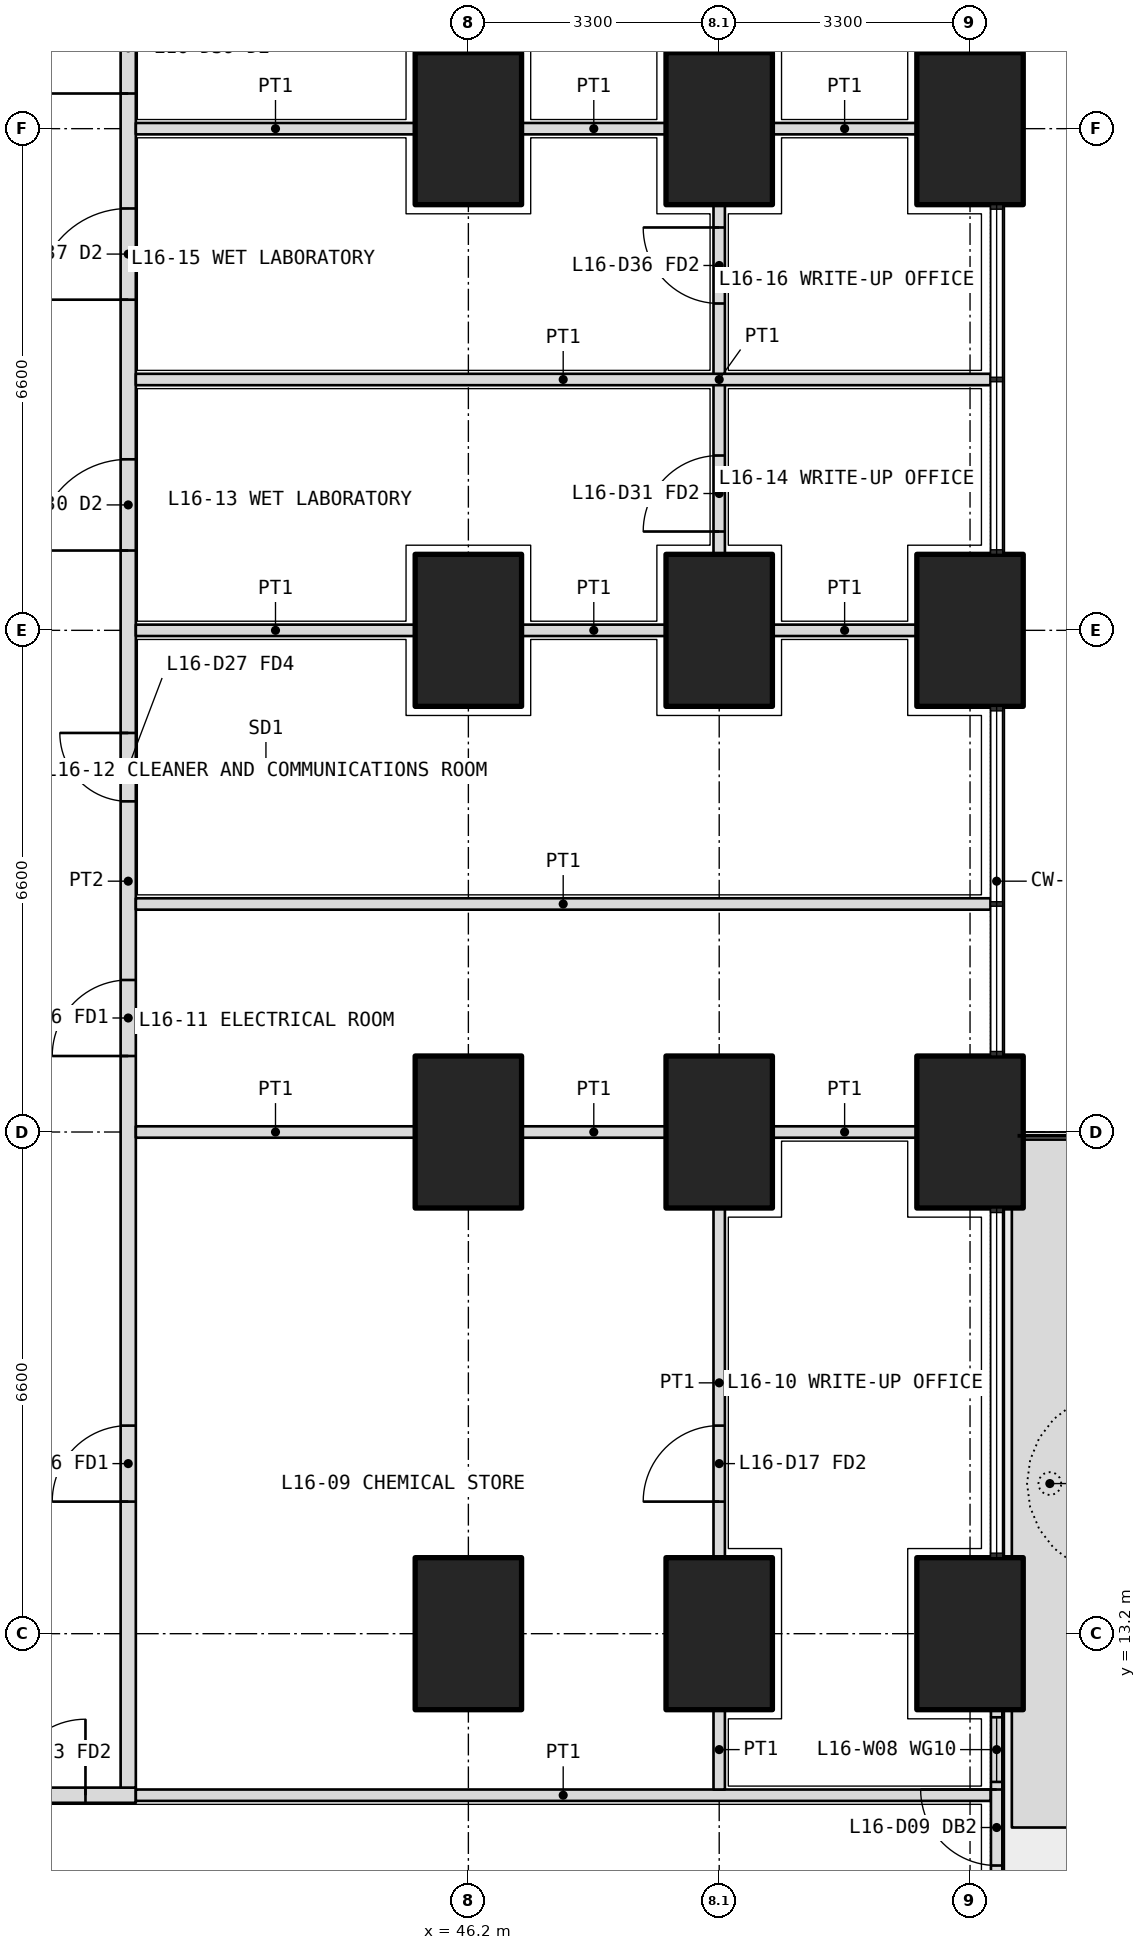
"""IFC4 building model, lengths in metres.
Left out: names, types, materials, properties, quantities, classifications, styles, units other than length and angle.
Written with IfcOpenShell. Run it as: python <this file> out.ifc"""

import sys

from ifc_helpers import new_model, si_unit, direction, frame, frame_2d, origin, origin_2d, place, context, subcontext, project, spatial, polyline, rectangle, outline, extrude, element, fill, save


model = new_model("IFC4")
c1 = context("Model", 3, precision=1e-05, world=origin(), true_north=direction((0.0, 1.0)))
c2 = subcontext(c1, "Body", "Model", "MODEL_VIEW")
j1 = project(units=[si_unit("LENGTHUNIT", "METRE"), si_unit("PLANEANGLEUNIT", "RADIAN")], contexts=[c1])
p1 = place(None, origin())
s1 = spatial("IfcSite", under=j1, at=p1, CompositionType="ELEMENT")
p2 = place(p1, origin())
s2 = spatial("IfcBuilding", under=s1, at=p2, CompositionType="ELEMENT")
p3 = place(p2, frame((0.0, 0.0, 71.7)))
s3 = spatial("IfcBuildingStorey", under=s2, at=p3, CompositionType="ELEMENT", Elevation=71.7)
for number, where, z_axis, x_axis in (
    (1, (52.8, 13.2, 0.0), (0.0, 0.0, 1.0), (0.0, 1.0, 0.0)),
    (2, (52.8, 19.8, 0.0), (0.0, 0.0, 1.0), (0.0, 1.0, 0.0)),
    (3, (52.8, 26.4, 0.0), (0.0, 0.0, 1.0), (0.0, 1.0, 0.0)),
    (4, (52.8, 33.0, 0.0), (0.0, 0.0, 1.0), (0.0, 1.0, 0.0)),
    (5, (49.5, 13.2, 0.0), (0.0, 0.0, 1.0), (0.0, 1.0, 0.0)),
    (6, (49.5, 19.8, 0.0), (0.0, 0.0, 1.0), (0.0, 1.0, 0.0)),
    (7, (49.5, 26.4, 0.0), (0.0, 0.0, 1.0), (0.0, 1.0, 0.0)),
    (8, (49.5, 33.0, 0.0), (0.0, 0.0, 1.0), (0.0, 1.0, 0.0)),
    (9, (46.2, 13.2, 0.0), (0.0, 0.0, 1.0), (0.0, 1.0, 0.0)),
    (10, (46.2, 19.8, 0.0), (0.0, 0.0, 1.0), (0.0, 1.0, 0.0)),
    (11, (46.2, 26.4, 0.0), (0.0, 0.0, 1.0), (0.0, 1.0, 0.0)),
    (12, (46.2, 33.0, 0.0), (0.0, 0.0, 1.0), (0.0, 1.0, 0.0)),
):
    element("IfcColumn", number, at=place(p3, frame(where, z_axis=z_axis, x_axis=x_axis)), inside=s3, PredefinedType="COLUMN", context=c2, shape_type="SweptSolid", body=[
        extrude(rectangle(XDim=2.0, YDim=1.4, at=origin_2d()), origin(), (0.0, 0.0, 1.0), 4.2),
    ])
p4 = place(p3, origin())
e13 = element("IfcWall", 13, at=p4, inside=s3, PredefinedType="USERDEFINED", context=c2, shape_type="SweptSolid", body=[
    extrude(outline(polyline([(53.35, 10.65), (54.35, 10.65), (54.35, 19.7), (53.35, 19.7), (53.35, 10.65)]), holes=[polyline([(53.5, 10.8), (54.2, 10.8), (54.2, 19.55), (53.5, 19.55), (53.5, 10.8)])]), origin(), (0.0, 0.0, 1.0), 1.05),
])
p5 = place(p3, frame((53.15, 7.6, 0.0), z_axis=(0.0, 0.0, 1.0), x_axis=(0.0, 1.0, 0.0)))
e14 = element("IfcWall", 14, at=p5, inside=s3, PredefinedType="SOLIDWALL", context=c2, shape_type="SweptSolid", body=[
    extrude(rectangle(XDim=4.6, YDim=0.15, at=frame_2d((2.3, 0.0))), origin(), (0.0, 0.0, 1.0), 2.05),
])
p6 = place(p5, frame((2.55, 0.0, 0.0)))
e15 = element("IfcOpeningElement", 15, at=p6, cuts=e14, PredefinedType="OPENING", context=c2, shape_type="SweptSolid", body=[
    extrude(rectangle(XDim=1.0, YDim=2.0, at=frame_2d((0.5, 1.0))), frame((0.0, 0.085, 0.0), z_axis=(0.0, -1.0, 0.0), x_axis=(1.0, 0.0, 0.0)), (0.0, 0.0, 1.0), 0.17),
])
p7 = place(p5, frame((0.1, 0.0, 0.1)))
e16 = element("IfcOpeningElement", 16, at=p7, cuts=e14, PredefinedType="OPENING", context=c2, shape_type="SweptSolid", body=[
    extrude(rectangle(XDim=1.95, YDim=1.65, at=frame_2d((0.975, 0.825))), frame((0.0, 0.085, 0.0), z_axis=(0.0, -1.0, 0.0), x_axis=(1.0, 0.0, 0.0)), (0.0, 0.0, 1.0), 0.17),
])
p8 = place(p5, frame((3.65, 0.0, 0.1)))
e17 = element("IfcOpeningElement", 17, at=p8, cuts=e14, PredefinedType="OPENING", context=c2, shape_type="SweptSolid", body=[
    extrude(rectangle(XDim=0.85, YDim=1.65, at=frame_2d((0.425, 0.825))), frame((0.0, 0.085, 0.0), z_axis=(0.0, -1.0, 0.0), x_axis=(1.0, 0.0, 0.0)), (0.0, 0.0, 1.0), 0.17),
])
p9 = place(p3, frame((10.975, 11.075, 0.0), z_axis=(0.0, 0.0, 1.0), x_axis=(1.0, 0.0, 0.0)))
e18 = element("IfcWall", 18, at=p9, inside=s3, PredefinedType="PARTITIONING", context=c2, shape_type="SweptSolid", body=[
    extrude(rectangle(XDim=30.85, YDim=0.2, at=frame_2d((15.425, 0.0))), origin(), (0.0, 0.0, 1.0), 2.55),
])
p10 = place(p9, frame((2.312, 0.0, 0.0)))
e19 = element("IfcOpeningElement", 19, at=p10, cuts=e18, PredefinedType="OPENING", context=c2, shape_type="SweptSolid", body=[
    extrude(rectangle(XDim=1.0, YDim=2.1, at=frame_2d((0.5, 1.05))), frame((0.0, 0.11, 0.0), z_axis=(0.0, -1.0, 0.0), x_axis=(1.0, 0.0, 0.0)), (0.0, 0.0, 1.0), 0.22),
])
p11 = place(p9, frame((11.625, 0.0, 0.0)))
e20 = element("IfcOpeningElement", 20, at=p11, cuts=e18, PredefinedType="OPENING", context=c2, shape_type="SweptSolid", body=[
    extrude(rectangle(XDim=1.0, YDim=2.1, at=frame_2d((0.5, 1.05))), frame((0.0, 0.11, 0.0), z_axis=(0.0, -1.0, 0.0), x_axis=(1.0, 0.0, 0.0)), (0.0, 0.0, 1.0), 0.22),
])
p12 = place(p9, frame((23.075, 0.0, 0.0)))
e21 = element("IfcOpeningElement", 21, at=p12, cuts=e18, PredefinedType="OPENING", context=c2, shape_type="SweptSolid", body=[
    extrude(rectangle(XDim=1.2, YDim=2.1, at=frame_2d((0.6, 1.05))), frame((0.0, 0.11, 0.0), z_axis=(0.0, -1.0, 0.0), x_axis=(1.0, 0.0, 0.0)), (0.0, 0.0, 1.0), 0.22),
])
p13 = place(p9, frame((29.188, 0.0, 0.0)))
e22 = element("IfcOpeningElement", 22, at=p13, cuts=e18, PredefinedType="OPENING", context=c2, shape_type="SweptSolid", body=[
    extrude(rectangle(XDim=1.0, YDim=2.1, at=frame_2d((0.5, 1.05))), frame((0.0, 0.11, 0.0), z_axis=(0.0, -1.0, 0.0), x_axis=(1.0, 0.0, 0.0)), (0.0, 0.0, 1.0), 0.22),
])
p14 = place(p3, frame((41.725, 11.175, 0.0), z_axis=(0.0, 0.0, 1.0), x_axis=(0.0, 1.0, 0.0)))
e23 = element("IfcWall", 23, at=p14, inside=s3, PredefinedType="PARTITIONING", context=c2, shape_type="SweptSolid", body=[
    extrude(rectangle(XDim=23.85, YDim=0.2, at=frame_2d((11.925, 0.0))), origin(), (0.0, 0.0, 1.0), 2.55),
])
p15 = place(p14, frame((3.762, 0.0, 0.0)))
e24 = element("IfcOpeningElement", 24, at=p15, cuts=e23, PredefinedType="OPENING", context=c2, shape_type="SweptSolid", body=[
    extrude(rectangle(XDim=1.0, YDim=2.1, at=frame_2d((0.5, 1.05))), frame((0.0, 0.11, 0.0), z_axis=(0.0, -1.0, 0.0), x_axis=(1.0, 0.0, 0.0)), (0.0, 0.0, 1.0), 0.22),
])
p16 = place(p14, frame((9.625, 0.0, 0.0)))
e25 = element("IfcOpeningElement", 25, at=p16, cuts=e23, PredefinedType="OPENING", context=c2, shape_type="SweptSolid", body=[
    extrude(rectangle(XDim=1.0, YDim=2.1, at=frame_2d((0.5, 1.05))), frame((0.0, 0.11, 0.0), z_axis=(0.0, -1.0, 0.0), x_axis=(1.0, 0.0, 0.0)), (0.0, 0.0, 1.0), 0.22),
])
p17 = place(p14, frame((12.975, 0.0, 0.0)))
e26 = element("IfcOpeningElement", 26, at=p17, cuts=e23, PredefinedType="OPENING", context=c2, shape_type="SweptSolid", body=[
    extrude(rectangle(XDim=0.9, YDim=2.1, at=frame_2d((0.45, 1.05))), frame((0.0, 0.11, 0.0), z_axis=(0.0, -1.0, 0.0), x_axis=(1.0, 0.0, 0.0)), (0.0, 0.0, 1.0), 0.22),
])
p18 = place(p14, frame((16.275, 0.0, 0.0)))
e27 = element("IfcOpeningElement", 27, at=p18, cuts=e23, PredefinedType="OPENING", context=c2, shape_type="SweptSolid", body=[
    extrude(rectangle(XDim=1.2, YDim=2.1, at=frame_2d((0.6, 1.05))), frame((0.0, 0.11, 0.0), z_axis=(0.0, -1.0, 0.0), x_axis=(1.0, 0.0, 0.0)), (0.0, 0.0, 1.0), 0.22),
])
p19 = place(p14, frame((19.575, 0.0, 0.0)))
e28 = element("IfcOpeningElement", 28, at=p19, cuts=e23, PredefinedType="OPENING", context=c2, shape_type="SweptSolid", body=[
    extrude(rectangle(XDim=1.2, YDim=2.1, at=frame_2d((0.6, 1.05))), frame((0.0, 0.11, 0.0), z_axis=(0.0, -1.0, 0.0), x_axis=(1.0, 0.0, 0.0)), (0.0, 0.0, 1.0), 0.22),
])
p20 = place(p14, frame((22.288, 0.0, 0.0)))
e29 = element("IfcOpeningElement", 29, at=p20, cuts=e23, PredefinedType="OPENING", context=c2, shape_type="SweptSolid", body=[
    extrude(rectangle(XDim=1.2, YDim=2.1, at=frame_2d((0.6, 1.05))), frame((0.0, 0.11, 0.0), z_axis=(0.0, -1.0, 0.0), x_axis=(1.0, 0.0, 0.0)), (0.0, 0.0, 1.0), 0.22),
])
p21 = place(p3, frame((53.07, 11.075, 0.0), z_axis=(0.0, 0.0, 1.0), x_axis=(-1.0, 0.0, 0.0)))
e30 = element("IfcWall", 30, at=p21, inside=s3, PredefinedType="PARTITIONING", context=c2, shape_type="SweptSolid", body=[
    extrude(rectangle(XDim=11.245, YDim=0.15, at=frame_2d((5.623, 0.0))), origin(), (0.0, 0.0, 1.0), 3.85),
])
p22 = place(p3, frame((49.5, 11.15, 0.0), z_axis=(0.0, 0.0, 1.0), x_axis=(0.0, 1.0, 0.0)))
e31 = element("IfcWall", 31, at=p22, inside=s3, PredefinedType="PARTITIONING", context=c2, shape_type="SweptSolid", body=[
    extrude(rectangle(XDim=1.05, YDim=0.15, at=frame_2d((0.525, 0.0))), origin(), (0.0, 0.0, 1.0), 2.55),
])
p23 = place(p3, frame((49.5, 14.2, 0.0), z_axis=(0.0, 0.0, 1.0), x_axis=(0.0, 1.0, 0.0)))
e32 = element("IfcWall", 32, at=p23, inside=s3, PredefinedType="PARTITIONING", context=c2, shape_type="SweptSolid", body=[
    extrude(rectangle(XDim=4.6, YDim=0.15, at=frame_2d((2.3, 0.0))), origin(), (0.0, 0.0, 1.0), 2.55),
])
p24 = place(p23, frame((0.738, 0.0, 0.0)))
e33 = element("IfcOpeningElement", 33, at=p24, cuts=e32, PredefinedType="OPENING", context=c2, shape_type="SweptSolid", body=[
    extrude(rectangle(XDim=1.0, YDim=2.1, at=frame_2d((0.5, 1.05))), frame((0.0, 0.085, 0.0), z_axis=(0.0, -1.0, 0.0), x_axis=(1.0, 0.0, 0.0)), (0.0, 0.0, 1.0), 0.17),
])
p25 = place(p3, frame((49.5, 27.4, 0.0), z_axis=(0.0, 0.0, 1.0), x_axis=(0.0, 1.0, 0.0)))
e34 = element("IfcWall", 34, at=p25, inside=s3, PredefinedType="PARTITIONING", context=c2, shape_type="SweptSolid", body=[
    extrude(rectangle(XDim=4.6, YDim=0.15, at=frame_2d((2.3, 0.0))), origin(), (0.0, 0.0, 1.0), 2.55),
])
p26 = place(p25, frame((0.3, 0.0, 0.0)))
e35 = element("IfcOpeningElement", 35, at=p26, cuts=e34, PredefinedType="OPENING", context=c2, shape_type="SweptSolid", body=[
    extrude(rectangle(XDim=1.0, YDim=2.1, at=frame_2d((0.5, 1.05))), frame((0.0, 0.085, 0.0), z_axis=(0.0, -1.0, 0.0), x_axis=(1.0, 0.0, 0.0)), (0.0, 0.0, 1.0), 0.17),
])
p27 = place(p25, frame((3.3, 0.0, 0.0)))
e36 = element("IfcOpeningElement", 36, at=p27, cuts=e34, PredefinedType="OPENING", context=c2, shape_type="SweptSolid", body=[
    extrude(rectangle(XDim=1.0, YDim=2.1, at=frame_2d((0.5, 1.05))), frame((0.0, 0.085, 0.0), z_axis=(0.0, -1.0, 0.0), x_axis=(1.0, 0.0, 0.0)), (0.0, 0.0, 1.0), 0.17),
])
p28 = place(p3, frame((53.07, 22.8, 0.0), z_axis=(0.0, 0.0, 1.0), x_axis=(-1.0, 0.0, 0.0)))
e37 = element("IfcWall", 37, at=p28, inside=s3, PredefinedType="PARTITIONING", context=c2, shape_type="SweptSolid", body=[
    extrude(rectangle(XDim=11.245, YDim=0.15, at=frame_2d((5.623, 0.0))), origin(), (0.0, 0.0, 1.0), 3.85),
])
for number, where, z_axis, x_axis in (
    (38, (52.1, 26.4, 0.0), (0.0, 0.0, 1.0), (-1.0, 0.0, 0.0)),
    (39, (48.8, 26.4, 0.0), (0.0, 0.0, 1.0), (-1.0, 0.0, 0.0)),
):
    element("IfcWall", number, at=place(p3, frame(where, z_axis=z_axis, x_axis=x_axis)), inside=s3, PredefinedType="PARTITIONING", context=c2, shape_type="SweptSolid", body=[
        extrude(rectangle(XDim=1.9, YDim=0.15, at=frame_2d((0.95, 0.0))), origin(), (0.0, 0.0, 1.0), 2.55),
    ])
p29 = place(p3, frame((45.5, 26.4, 0.0), z_axis=(0.0, 0.0, 1.0), x_axis=(-1.0, 0.0, 0.0)))
e40 = element("IfcWall", 40, at=p29, inside=s3, PredefinedType="PARTITIONING", context=c2, shape_type="SweptSolid", body=[
    extrude(rectangle(XDim=3.675, YDim=0.15, at=frame_2d((1.837, 0.0))), origin(), (0.0, 0.0, 1.0), 2.55),
])
for number, where, z_axis, x_axis in (
    (41, (52.1, 19.8, 0.0), (0.0, 0.0, 1.0), (-1.0, 0.0, 0.0)),
    (42, (48.8, 19.8, 0.0), (0.0, 0.0, 1.0), (-1.0, 0.0, 0.0)),
):
    element("IfcWall", number, at=place(p3, frame(where, z_axis=z_axis, x_axis=x_axis)), inside=s3, PredefinedType="PARTITIONING", context=c2, shape_type="SweptSolid", body=[
        extrude(rectangle(XDim=1.9, YDim=0.15, at=frame_2d((0.95, 0.0))), origin(), (0.0, 0.0, 1.0), 2.55),
    ])
p30 = place(p3, frame((45.5, 19.8, 0.0), z_axis=(0.0, 0.0, 1.0), x_axis=(-1.0, 0.0, 0.0)))
e43 = element("IfcWall", 43, at=p30, inside=s3, PredefinedType="PARTITIONING", context=c2, shape_type="SweptSolid", body=[
    extrude(rectangle(XDim=3.675, YDim=0.15, at=frame_2d((1.837, 0.0))), origin(), (0.0, 0.0, 1.0), 2.55),
])
p31 = place(p3, frame((53.07, 29.7, 0.0), z_axis=(0.0, 0.0, 1.0), x_axis=(-1.0, 0.0, 0.0)))
e44 = element("IfcWall", 44, at=p31, inside=s3, PredefinedType="PARTITIONING", context=c2, shape_type="SweptSolid", body=[
    extrude(rectangle(XDim=11.245, YDim=0.15, at=frame_2d((5.623, 0.0))), origin(), (0.0, 0.0, 1.0), 3.85),
])
for number, where, z_axis, x_axis in (
    (45, (52.1, 33.0, 0.0), (0.0, 0.0, 1.0), (-1.0, 0.0, 0.0)),
    (46, (48.8, 33.0, 0.0), (0.0, 0.0, 1.0), (-1.0, 0.0, 0.0)),
):
    element("IfcWall", number, at=place(p3, frame(where, z_axis=z_axis, x_axis=x_axis)), inside=s3, PredefinedType="PARTITIONING", context=c2, shape_type="SweptSolid", body=[
        extrude(rectangle(XDim=1.9, YDim=0.15, at=frame_2d((0.95, 0.0))), origin(), (0.0, 0.0, 1.0), 2.55),
    ])
p32 = place(p3, frame((45.5, 33.0, 0.0), z_axis=(0.0, 0.0, 1.0), x_axis=(-1.0, 0.0, 0.0)))
e47 = element("IfcWall", 47, at=p32, inside=s3, PredefinedType="PARTITIONING", context=c2, shape_type="SweptSolid", body=[
    extrude(rectangle(XDim=3.675, YDim=0.15, at=frame_2d((1.837, 0.0))), origin(), (0.0, 0.0, 1.0), 2.55),
])
p33 = place(p6, origin())
e48 = element("IfcDoor", 48, at=p33, inside=s3, OperationType="SINGLE_SWING_RIGHT", PredefinedType="DOOR", context=c2, shape_type="SweptSolid", body=[
    extrude(rectangle(XDim=1.0, YDim=2.0, at=frame_2d((0.5, 1.0))), frame((0.0, 0.025, 0.0), z_axis=(0.0, -1.0, 0.0), x_axis=(1.0, 0.0, 0.0)), (0.0, 0.0, 1.0), 0.05),
])
fill(e15, e48)
p34 = place(p8, origin())
e49 = element("IfcWindow", 49, at=p34, inside=s3, PartitioningType="SINGLE_PANEL", PredefinedType="WINDOW", context=c2, shape_type="SweptSolid", body=[
    extrude(rectangle(XDim=0.85, YDim=1.65, at=frame_2d((0.425, 0.825))), frame((0.0, 0.03, 0.0), z_axis=(0.0, -1.0, 0.0), x_axis=(1.0, 0.0, 0.0)), (0.0, 0.0, 1.0), 0.06),
])
fill(e17, e49)
p35 = place(p13, origin())
e50 = element("IfcDoor", 50, at=p35, inside=s3, OperationType="SINGLE_SWING_RIGHT", PredefinedType="DOOR", context=c2, shape_type="SweptSolid", body=[
    extrude(rectangle(XDim=1.0, YDim=2.1, at=frame_2d((0.5, 1.05))), frame((0.0, 0.025, 0.0), z_axis=(0.0, -1.0, 0.0), x_axis=(1.0, 0.0, 0.0)), (0.0, 0.0, 1.0), 0.05),
])
fill(e22, e50)
p36 = place(p15, origin())
e51 = element("IfcDoor", 51, at=p36, inside=s3, OperationType="SINGLE_SWING_LEFT", PredefinedType="DOOR", context=c2, shape_type="SweptSolid", body=[
    extrude(rectangle(XDim=1.0, YDim=2.1, at=frame_2d((0.5, 1.05))), frame((0.0, 0.025, 0.0), z_axis=(0.0, -1.0, 0.0), x_axis=(1.0, 0.0, 0.0)), (0.0, 0.0, 1.0), 0.05),
])
fill(e24, e51)
p37 = place(p24, origin())
e52 = element("IfcDoor", 52, at=p37, inside=s3, OperationType="SINGLE_SWING_LEFT", PredefinedType="DOOR", context=c2, shape_type="SweptSolid", body=[
    extrude(rectangle(XDim=1.0, YDim=2.1, at=frame_2d((0.5, 1.05))), frame((0.0, 0.025, 0.0), z_axis=(0.0, -1.0, 0.0), x_axis=(1.0, 0.0, 0.0)), (0.0, 0.0, 1.0), 0.05),
])
fill(e33, e52)
p38 = place(p16, origin())
e53 = element("IfcDoor", 53, at=p38, inside=s3, OperationType="SINGLE_SWING_LEFT", PredefinedType="DOOR", context=c2, shape_type="SweptSolid", body=[
    extrude(rectangle(XDim=1.0, YDim=2.1, at=frame_2d((0.5, 1.05))), frame((0.0, 0.025, 0.0), z_axis=(0.0, -1.0, 0.0), x_axis=(1.0, 0.0, 0.0)), (0.0, 0.0, 1.0), 0.05),
])
fill(e25, e53)
p39 = place(p17, origin())
e54 = element("IfcDoor", 54, at=p39, inside=s3, OperationType="SINGLE_SWING_RIGHT", PredefinedType="DOOR", context=c2, shape_type="SweptSolid", body=[
    extrude(rectangle(XDim=0.9, YDim=2.1, at=frame_2d((0.45, 1.05))), frame((0.0, 0.025, 0.0), z_axis=(0.0, -1.0, 0.0), x_axis=(1.0, 0.0, 0.0)), (0.0, 0.0, 1.0), 0.05),
])
fill(e26, e54)
p40 = place(p18, origin())
e55 = element("IfcDoor", 55, at=p40, inside=s3, OperationType="DOUBLE_DOOR_SINGLE_SWING", PredefinedType="DOOR", context=c2, shape_type="SweptSolid", body=[
    extrude(rectangle(XDim=1.2, YDim=2.1, at=frame_2d((0.6, 1.05))), frame((0.0, 0.025, 0.0), z_axis=(0.0, -1.0, 0.0), x_axis=(1.0, 0.0, 0.0)), (0.0, 0.0, 1.0), 0.05),
])
fill(e27, e55)
p41 = place(p26, origin())
e56 = element("IfcDoor", 56, at=p41, inside=s3, OperationType="SINGLE_SWING_LEFT", PredefinedType="DOOR", context=c2, shape_type="SweptSolid", body=[
    extrude(rectangle(XDim=1.0, YDim=2.1, at=frame_2d((0.5, 1.05))), frame((0.0, 0.025, 0.0), z_axis=(0.0, -1.0, 0.0), x_axis=(1.0, 0.0, 0.0)), (0.0, 0.0, 1.0), 0.05),
])
fill(e35, e56)
p42 = place(p19, origin())
e57 = element("IfcDoor", 57, at=p42, inside=s3, OperationType="DOUBLE_DOOR_SINGLE_SWING", PredefinedType="DOOR", context=c2, shape_type="SweptSolid", body=[
    extrude(rectangle(XDim=1.2, YDim=2.1, at=frame_2d((0.6, 1.05))), frame((0.0, 0.025, 0.0), z_axis=(0.0, -1.0, 0.0), x_axis=(1.0, 0.0, 0.0)), (0.0, 0.0, 1.0), 0.05),
])
fill(e28, e57)
p43 = place(p27, origin())
e58 = element("IfcDoor", 58, at=p43, inside=s3, OperationType="SINGLE_SWING_RIGHT", PredefinedType="DOOR", context=c2, shape_type="SweptSolid", body=[
    extrude(rectangle(XDim=1.0, YDim=2.1, at=frame_2d((0.5, 1.05))), frame((0.0, 0.025, 0.0), z_axis=(0.0, -1.0, 0.0), x_axis=(1.0, 0.0, 0.0)), (0.0, 0.0, 1.0), 0.05),
])
fill(e36, e58)
p44 = place(p20, origin())
e59 = element("IfcDoor", 59, at=p44, inside=s3, OperationType="DOUBLE_DOOR_SINGLE_SWING", PredefinedType="DOOR", context=c2, shape_type="SweptSolid", body=[
    extrude(rectangle(XDim=1.2, YDim=2.1, at=frame_2d((0.6, 1.05))), frame((0.0, 0.025, 0.0), z_axis=(0.0, -1.0, 0.0), x_axis=(1.0, 0.0, 0.0)), (0.0, 0.0, 1.0), 0.05),
])
fill(e29, e59)
save(model, sys.argv[1])
